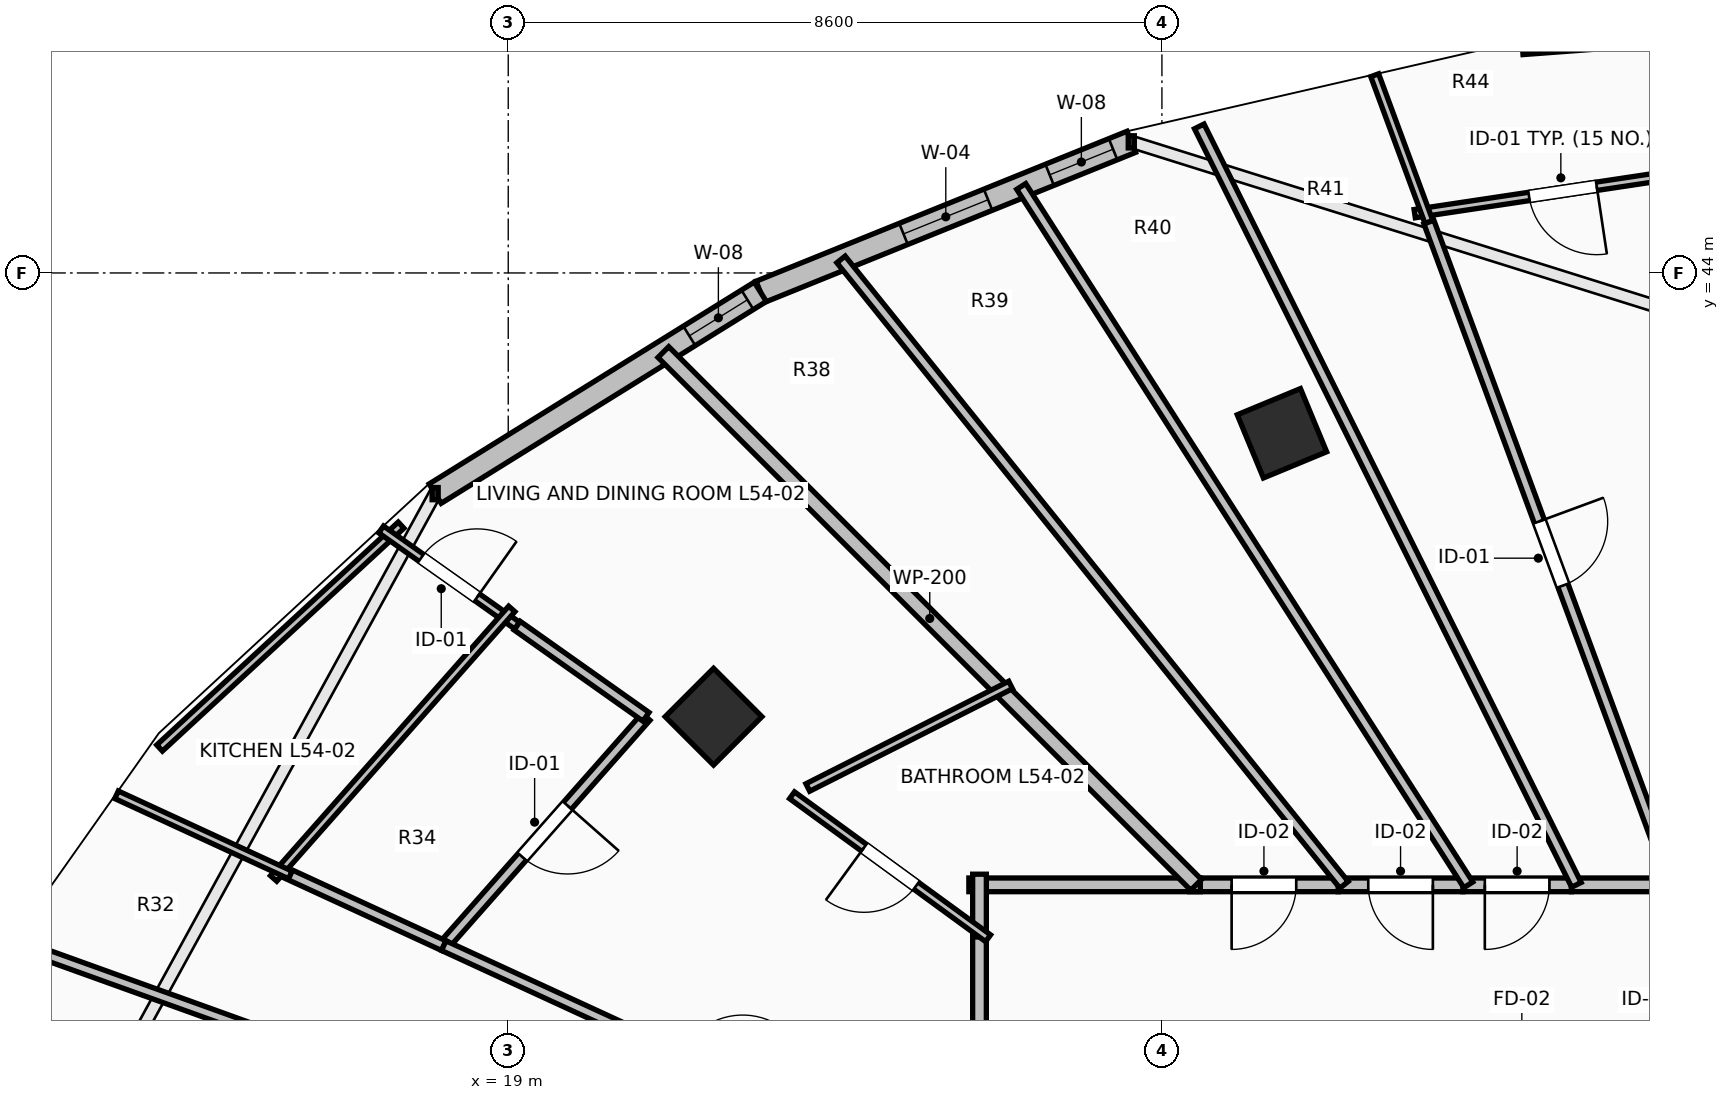
"""IFC4 building model, lengths in metres.
Left out: names, types, materials, properties, quantities, classifications, styles, units other than length and angle.
Written with IfcOpenShell. Run it as: python <this file> out.ifc"""

import sys

from ifc_helpers import new_model, si_unit, direction, frame, frame_2d, origin, origin_2d, place, context, subcontext, project, spatial, rectangle, extrude, element, fill, save


model = new_model("IFC4")
c1 = context("Model", 3, precision=1e-05, world=origin(), true_north=direction((0.0, 1.0)))
c2 = subcontext(c1, "Body", "Model", "MODEL_VIEW")
j1 = project(units=[si_unit("LENGTHUNIT", "METRE"), si_unit("PLANEANGLEUNIT", "RADIAN")], contexts=[c1])
p1 = place(None, origin())
s1 = spatial("IfcSite", under=j1, at=p1, CompositionType="ELEMENT")
p2 = place(p1, origin())
s2 = spatial("IfcBuilding", under=s1, at=p2, CompositionType="ELEMENT")
p3 = place(p2, frame((0.0, 0.0, 200.1)))
s3 = spatial("IfcBuildingStorey", under=s2, at=p3, CompositionType="ELEMENT", Elevation=200.1)
for number, where, z_axis, x_axis in (
    (1, (29.179, 41.891, 0.0), (0.0, 0.0, 1.0), (-0.383, 0.924, 0.0)),
    (2, (21.701, 38.162, 0.0), (0.0, 0.0, 1.0), (-0.707, 0.707, 0.0)),
):
    element("IfcColumn", number, at=place(p3, frame(where, z_axis=z_axis, x_axis=x_axis)), inside=s3, PredefinedType="COLUMN", context=c2, shape_type="SweptSolid", body=[
        extrude(rectangle(XDim=0.9, YDim=0.9, at=origin_2d()), origin(), (0.0, 0.0, 1.0), 3.55),
    ])
p4 = place(p3, frame((27.197, 45.725, 0.0), z_axis=(0.0, 0.0, 1.0), x_axis=(-0.927111094334, -0.374786630981, 0.0)))
e3 = element("IfcWall", 3, at=p4, inside=s3, PredefinedType="STANDARD", context=c2, shape_type="SweptSolid", body=[
    extrude(rectangle(XDim=5.264, YDim=0.3, at=frame_2d((2.632, 0.0))), origin(), (0.0, 0.0, 1.0), 3.29),
])
p5 = place(p4, frame((0.258, 0.0, 0.85)))
e4 = element("IfcOpeningElement", 4, at=p5, cuts=e3, PredefinedType="OPENING", context=c2, shape_type="SweptSolid", body=[
    extrude(rectangle(XDim=0.9, YDim=1.8, at=frame_2d((0.45, 0.9))), frame((0.0, 0.165, 0.0), z_axis=(0.0, -1.0, 0.0), x_axis=(1.0, 0.0, 0.0)), (0.0, 0.0, 1.0), 0.33),
])
p6 = place(p4, frame((2.032, 0.0, 0.85)))
e5 = element("IfcOpeningElement", 5, at=p6, cuts=e3, PredefinedType="OPENING", context=c2, shape_type="SweptSolid", body=[
    extrude(rectangle(XDim=1.2, YDim=1.95, at=frame_2d((0.6, 0.975))), frame((0.0, 0.165, 0.0), z_axis=(0.0, -1.0, 0.0), x_axis=(1.0, 0.0, 0.0)), (0.0, 0.0, 1.0), 0.33),
])
p7 = place(p3, frame((22.316, 43.752, 0.0), z_axis=(0.0, 0.0, 1.0), x_axis=(-0.849647657754, -0.527350791858, 0.0)))
e6 = element("IfcWall", 6, at=p7, inside=s3, PredefinedType="STANDARD", context=c2, shape_type="SweptSolid", body=[
    extrude(rectangle(XDim=5.035, YDim=0.3, at=frame_2d((2.518, 0.0))), origin(), (0.0, 0.0, 1.0), 3.29),
])
p8 = place(p7, frame((0.199, 0.0, 0.85)))
e7 = element("IfcOpeningElement", 7, at=p8, cuts=e6, PredefinedType="OPENING", context=c2, shape_type="SweptSolid", body=[
    extrude(rectangle(XDim=0.9, YDim=1.8, at=frame_2d((0.45, 0.9))), frame((0.0, 0.165, 0.0), z_axis=(0.0, -1.0, 0.0), x_axis=(1.0, 0.0, 0.0)), (0.0, 0.0, 1.0), 0.33),
])
p9 = place(p3, frame((34.265, 35.95, 0.0), z_axis=(0.0, 0.0, 1.0), x_axis=(-1.0, 0.0, 0.0)))
e8 = element("IfcWall", 8, at=p9, inside=s3, PredefinedType="PARTITIONING", context=c2, shape_type="SweptSolid", body=[
    extrude(rectangle(XDim=1.279, YDim=0.18, at=frame_2d((0.639, 0.0))), origin(), (0.0, 0.0, 1.0), 3.29),
])
p10 = place(p3, frame((32.986, 35.95, 0.0), z_axis=(0.0, 0.0, 1.0), x_axis=(-1.0, 0.0, 0.0)))
e9 = element("IfcWall", 9, at=p10, inside=s3, PredefinedType="PARTITIONING", context=c2, shape_type="SweptSolid", body=[
    extrude(rectangle(XDim=1.426, YDim=0.18, at=frame_2d((0.713, 0.0))), origin(), (0.0, 0.0, 1.0), 3.29),
])
p11 = place(p10, frame((0.288, 0.0, 0.0)))
e10 = element("IfcOpeningElement", 10, at=p11, cuts=e9, PredefinedType="OPENING", context=c2, shape_type="SweptSolid", body=[
    extrude(rectangle(XDim=0.85, YDim=2.1, at=frame_2d((0.425, 1.05))), frame((0.0, 0.105, 0.0), z_axis=(0.0, -1.0, 0.0), x_axis=(1.0, 0.0, 0.0)), (0.0, 0.0, 1.0), 0.21),
])
p12 = place(p3, frame((31.56, 35.95, 0.0), z_axis=(0.0, 0.0, 1.0), x_axis=(-1.0, 0.0, 0.0)))
e11 = element("IfcWall", 11, at=p12, inside=s3, PredefinedType="PARTITIONING", context=c2, shape_type="SweptSolid", body=[
    extrude(rectangle(XDim=1.641, YDim=0.18, at=frame_2d((0.821, 0.0))), origin(), (0.0, 0.0, 1.0), 2.482),
])
p13 = place(p12, frame((0.396, 0.0, 0.0)))
e12 = element("IfcOpeningElement", 12, at=p13, cuts=e11, PredefinedType="OPENING", context=c2, shape_type="SweptSolid", body=[
    extrude(rectangle(XDim=0.85, YDim=2.1, at=frame_2d((0.425, 1.05))), frame((0.0, 0.105, 0.0), z_axis=(0.0, -1.0, 0.0), x_axis=(1.0, 0.0, 0.0)), (0.0, 0.0, 1.0), 0.21),
])
p14 = place(p3, frame((29.919, 35.95, 0.0), z_axis=(0.0, 0.0, 1.0), x_axis=(-1.0, 0.0, 0.0)))
e13 = element("IfcWall", 13, at=p14, inside=s3, PredefinedType="PARTITIONING", context=c2, shape_type="SweptSolid", body=[
    extrude(rectangle(XDim=1.954, YDim=0.18, at=frame_2d((0.977, 0.0))), origin(), (0.0, 0.0, 1.0), 2.482),
])
p15 = place(p14, frame((0.552, 0.0, 0.0)))
e14 = element("IfcOpeningElement", 14, at=p15, cuts=e13, PredefinedType="OPENING", context=c2, shape_type="SweptSolid", body=[
    extrude(rectangle(XDim=0.85, YDim=2.1, at=frame_2d((0.425, 1.05))), frame((0.0, 0.105, 0.0), z_axis=(0.0, -1.0, 0.0), x_axis=(1.0, 0.0, 0.0)), (0.0, 0.0, 1.0), 0.21),
])
p16 = place(p3, frame((25.2, 35.404, 0.0), z_axis=(0.0, 0.0, 1.0), x_axis=(0.0, -1.0, 0.0)))
e15 = element("IfcWall", 15, at=p16, inside=s3, PredefinedType="PARTITIONING", context=c2, shape_type="SweptSolid", body=[
    extrude(rectangle(XDim=3.563, YDim=0.18, at=frame_2d((1.781, 0.0))), origin(), (0.0, 0.0, 1.0), 2.482),
])
p17 = place(p16, frame((1.281, 0.0, 0.0)))
e16 = element("IfcOpeningElement", 16, at=p17, cuts=e15, PredefinedType="OPENING", context=c2, shape_type="SweptSolid", body=[
    extrude(rectangle(XDim=1.0, YDim=2.15, at=frame_2d((0.5, 1.075))), frame((0.0, 0.105, 0.0), z_axis=(0.0, -1.0, 0.0), x_axis=(1.0, 0.0, 0.0)), (0.0, 0.0, 1.0), 0.21),
])
p18 = place(p3, frame((28.105, 35.95, 0.0), z_axis=(0.0, 0.0, 1.0), x_axis=(-1.0, 0.0, 0.0)))
e17 = element("IfcWall", 17, at=p18, inside=s3, PredefinedType="PARTITIONING", context=c2, shape_type="SweptSolid", body=[
    extrude(rectangle(XDim=3.045, YDim=0.18, at=frame_2d((1.522, 0.0))), origin(), (0.0, 0.0, 1.0), 2.482),
])
p19 = place(p3, frame((25.2, 36.09, 0.0), z_axis=(0.0, 0.0, 1.0), x_axis=(0.0, -1.0, 0.0)))
e18 = element("IfcWall", 18, at=p19, inside=s3, PredefinedType="PARTITIONING", context=c2, shape_type="SweptSolid", body=[
    extrude(rectangle(XDim=0.826, YDim=0.18, at=frame_2d((0.413, 0.0))), origin(), (0.0, 0.0, 1.0), 2.482),
])
p20 = place(p3, frame((34.589, 47.095, 0.0), z_axis=(0.0, 0.0, 1.0), x_axis=(-0.997205784552, -0.074703569226, 0.0)))
e19 = element("IfcWall", 19, at=p20, inside=s3, PredefinedType="PARTITIONING", context=c2, shape_type="SweptSolid", body=[
    extrude(rectangle(XDim=2.249, YDim=0.11, at=frame_2d((1.124, 0.0))), origin(), (0.0, 0.0, 1.0), 3.29),
])
p21 = place(p3, frame((34.824, 45.367, 0.0), z_axis=(0.0, 0.0, 1.0), x_axis=(-0.988877230123, -0.148734070555, 0.0)))
e20 = element("IfcWall", 20, at=p21, inside=s3, PredefinedType="PARTITIONING", context=c2, shape_type="SweptSolid", body=[
    extrude(rectangle(XDim=3.943, YDim=0.11, at=frame_2d((1.971, 0.0))), origin(), (0.0, 0.0, 1.0), 3.29),
])
p22 = place(p21, frame((1.521, 0.0, 0.0)))
e21 = element("IfcOpeningElement", 21, at=p22, cuts=e20, PredefinedType="OPENING", context=c2, shape_type="SweptSolid", body=[
    extrude(rectangle(XDim=0.9, YDim=2.1, at=frame_2d((0.45, 1.05))), frame((0.0, 0.07, 0.0), z_axis=(0.0, -1.0, 0.0), x_axis=(1.0, 0.0, 0.0)), (0.0, 0.0, 1.0), 0.14),
])
p23 = place(p3, frame((31.113, 44.67, 0.0), z_axis=(0.0, 0.0, 1.0), x_axis=(-0.346337161188, 0.938110105894, 0.0)))
e22 = element("IfcWall", 22, at=p23, inside=s3, PredefinedType="PARTITIONING", context=c2, shape_type="SweptSolid", body=[
    extrude(rectangle(XDim=2.059, YDim=0.11, at=frame_2d((1.03, 0.0))), origin(), (0.0, 0.0, 1.0), 3.29),
])
p24 = place(p3, frame((31.112, 44.67, 0.0), z_axis=(0.0, 0.0, 1.0), x_axis=(0.346109472243, -0.938194134081, 0.0)))
e23 = element("IfcWall", 23, at=p24, inside=s3, PredefinedType="PARTITIONING", context=c2, shape_type="SweptSolid", body=[
    extrude(rectangle(XDim=9.294, YDim=0.14, at=frame_2d((4.647, 0.0))), origin(), (0.0, 0.0, 1.0), 2.482),
])
p25 = place(p24, frame((4.197, 0.0, 0.0)))
e24 = element("IfcOpeningElement", 24, at=p25, cuts=e23, PredefinedType="OPENING", context=c2, shape_type="SweptSolid", body=[
    extrude(rectangle(XDim=0.9, YDim=2.1, at=frame_2d((0.45, 1.05))), frame((0.0, 0.085, 0.0), z_axis=(0.0, -1.0, 0.0), x_axis=(1.0, 0.0, 0.0)), (0.0, 0.0, 1.0), 0.17),
])
p26 = place(p3, frame((28.091, 45.928, 0.0), z_axis=(0.0, 0.0, 1.0), x_axis=(0.445267068418, -0.895397809793, 0.0)))
e25 = element("IfcWall", 25, at=p26, inside=s3, PredefinedType="PARTITIONING", context=c2, shape_type="SweptSolid", body=[
    extrude(rectangle(XDim=11.144, YDim=0.14, at=frame_2d((5.572, 0.0))), origin(), (0.0, 0.0, 1.0), 2.482),
])
p27 = place(p3, frame((25.749, 45.138, 0.0), z_axis=(0.0, 0.0, 1.0), x_axis=(0.539168632786, -0.842197830335, 0.0)))
e26 = element("IfcWall", 26, at=p27, inside=s3, PredefinedType="PARTITIONING", context=c2, shape_type="SweptSolid", body=[
    extrude(rectangle(XDim=10.909, YDim=0.14, at=frame_2d((5.455, 0.0))), origin(), (0.0, 0.0, 1.0), 2.482),
])
p28 = place(p3, frame((23.378, 44.178, 0.0), z_axis=(0.0, 0.0, 1.0), x_axis=(0.626756813732, -0.779214923137, 0.0)))
e27 = element("IfcWall", 27, at=p28, inside=s3, PredefinedType="PARTITIONING", context=c2, shape_type="SweptSolid", body=[
    extrude(rectangle(XDim=10.559, YDim=0.14, at=frame_2d((5.28, 0.0))), origin(), (0.0, 0.0, 1.0), 2.482),
])
p29 = place(p3, frame((21.041, 42.959, 0.0), z_axis=(0.0, 0.0, 1.0), x_axis=(0.707106781187, -0.707106781187, 0.0)))
e28 = element("IfcWall", 28, at=p29, inside=s3, PredefinedType="PARTITIONING", context=c2, shape_type="SweptSolid", body=[
    extrude(rectangle(XDim=9.912, YDim=0.2, at=frame_2d((4.956, 0.0))), origin(), (0.0, 0.0, 1.0), 2.482),
])
p30 = place(p3, frame((25.313, 35.248, 0.0), z_axis=(0.0, 0.0, 1.0), x_axis=(-0.807968083988, 0.58922625133, 0.0)))
e29 = element("IfcWall", 29, at=p30, inside=s3, PredefinedType="PARTITIONING", context=c2, shape_type="SweptSolid", body=[
    extrude(rectangle(XDim=3.192, YDim=0.11, at=frame_2d((1.596, 0.0))), origin(), (0.0, 0.0, 1.0), 2.482),
])
p31 = place(p30, frame((1.171, 0.0, 0.0)))
e30 = element("IfcOpeningElement", 30, at=p31, cuts=e29, PredefinedType="OPENING", context=c2, shape_type="SweptSolid", body=[
    extrude(rectangle(XDim=0.85, YDim=2.1, at=frame_2d((0.425, 1.05))), frame((0.0, 0.07, 0.0), z_axis=(0.0, -1.0, 0.0), x_axis=(1.0, 0.0, 0.0)), (0.0, 0.0, 1.0), 0.14),
])
p32 = place(p3, frame((22.941, 37.231, 0.0), z_axis=(0.0, 0.0, 1.0), x_axis=(0.892507731149, 0.451032094024, 0.0)))
e31 = element("IfcWall", 31, at=p32, inside=s3, PredefinedType="PARTITIONING", context=c2, shape_type="SweptSolid", body=[
    extrude(rectangle(XDim=2.989, YDim=0.11, at=frame_2d((1.495, 0.0))), origin(), (0.0, 0.0, 1.0), 2.482),
])
p33 = place(p3, frame((17.59, 40.682, 0.0), z_axis=(0.0, 0.0, 1.0), x_axis=(-0.734861902375, -0.678216768031, 0.0)))
e32 = element("IfcWall", 32, at=p33, inside=s3, PredefinedType="PARTITIONING", context=c2, shape_type="SweptSolid", body=[
    extrude(rectangle(XDim=4.323, YDim=0.11, at=frame_2d((2.162, 0.0))), origin(), (0.0, 0.0, 1.0), 3.29),
])
p34 = place(p3, frame((17.328, 40.626, 0.0), z_axis=(0.0, 0.0, 1.0), x_axis=(0.816448938693, -0.577417639588, 0.0)))
e33 = element("IfcWall", 33, at=p34, inside=s3, PredefinedType="PARTITIONING", context=c2, shape_type="SweptSolid", body=[
    extrude(rectangle(XDim=2.192, YDim=0.11, at=frame_2d((1.096, 0.0))), origin(), (0.0, 0.0, 1.0), 3.29),
])
p35 = place(p34, frame((0.646, 0.0, 0.0)))
e34 = element("IfcOpeningElement", 34, at=p35, cuts=e33, PredefinedType="OPENING", context=c2, shape_type="SweptSolid", body=[
    extrude(rectangle(XDim=0.9, YDim=2.1, at=frame_2d((0.45, 1.05))), frame((0.0, 0.07, 0.0), z_axis=(0.0, -1.0, 0.0), x_axis=(1.0, 0.0, 0.0)), (0.0, 0.0, 1.0), 0.14),
])
p36 = place(p3, frame((20.812, 38.161, 0.0), z_axis=(0.0, 0.0, 1.0), x_axis=(-0.662063683649, -0.749447582418, 0.0)))
e35 = element("IfcWall", 35, at=p36, inside=s3, PredefinedType="PARTITIONING", context=c2, shape_type="SweptSolid", body=[
    extrude(rectangle(XDim=4.018, YDim=0.14, at=frame_2d((2.009, 0.0))), origin(), (0.0, 0.0, 1.0), 3.29),
])
p37 = place(p36, frame((1.559, 0.0, 0.0)))
e36 = element("IfcOpeningElement", 36, at=p37, cuts=e35, PredefinedType="OPENING", context=c2, shape_type="SweptSolid", body=[
    extrude(rectangle(XDim=0.9, YDim=2.1, at=frame_2d((0.45, 1.05))), frame((0.0, 0.085, 0.0), z_axis=(0.0, -1.0, 0.0), x_axis=(1.0, 0.0, 0.0)), (0.0, 0.0, 1.0), 0.17),
])
p38 = place(p3, frame((18.152, 35.15, 0.0), z_axis=(0.0, 0.0, 1.0), x_axis=(-0.908192094718, 0.418553603607, 0.0)))
e37 = element("IfcWall", 37, at=p38, inside=s3, PredefinedType="PARTITIONING", context=c2, shape_type="SweptSolid", body=[
    extrude(rectangle(XDim=2.363, YDim=0.14, at=frame_2d((1.182, 0.0))), origin(), (0.0, 0.0, 1.0), 3.29),
])
p39 = place(p3, frame((19.117, 39.36, 0.0), z_axis=(0.0, 0.0, 1.0), x_axis=(0.816315567802, -0.577606175316, 0.0)))
e38 = element("IfcWall", 38, at=p39, inside=s3, PredefinedType="PARTITIONING", context=c2, shape_type="SweptSolid", body=[
    extrude(rectangle(XDim=2.076, YDim=0.14, at=frame_2d((1.038, 0.0))), origin(), (0.0, 0.0, 1.0), 3.29),
])
p40 = place(p3, frame((18.152, 35.15, 0.0), z_axis=(0.0, 0.0, 1.0), x_axis=(0.908152637685, -0.418639208227, 0.0)))
e39 = element("IfcWall", 39, at=p40, inside=s3, PredefinedType="PARTITIONING", context=c2, shape_type="SweptSolid", body=[
    extrude(rectangle(XDim=7.761, YDim=0.14, at=frame_2d((3.88, 0.0))), origin(), (0.0, 0.0, 1.0), 2.824),
])
p41 = place(p40, frame((3.43, 0.0, 0.0)))
e40 = element("IfcOpeningElement", 40, at=p41, cuts=e39, PredefinedType="OPENING", context=c2, shape_type="SweptSolid", body=[
    extrude(rectangle(XDim=0.9, YDim=2.1, at=frame_2d((0.45, 1.05))), frame((0.0, 0.085, 0.0), z_axis=(0.0, -1.0, 0.0), x_axis=(1.0, 0.0, 0.0)), (0.0, 0.0, 1.0), 0.17),
])
p42 = place(p3, frame((15.913, 36.034, 0.0), z_axis=(0.0, 0.0, 1.0), x_axis=(0.662189711464, 0.749336230294, 0.0)))
e41 = element("IfcWall", 41, at=p42, inside=s3, PredefinedType="PARTITIONING", context=c2, shape_type="SweptSolid", body=[
    extrude(rectangle(XDim=4.732, YDim=0.11, at=frame_2d((2.366, 0.0))), origin(), (0.0, 0.0, 1.0), 3.29),
])
p43 = place(p3, frame((13.847, 37.135, 0.0), z_axis=(0.0, 0.0, 1.0), x_axis=(0.908101251341, -0.418750662462, 0.0)))
e42 = element("IfcWall", 42, at=p43, inside=s3, PredefinedType="PARTITIONING", context=c2, shape_type="SweptSolid", body=[
    extrude(rectangle(XDim=2.518, YDim=0.11, at=frame_2d((1.259, 0.0))), origin(), (0.0, 0.0, 1.0), 3.29),
])
p44 = place(p3, frame((12.609, 35.141, 0.0), z_axis=(0.0, 0.0, 1.0), x_axis=(0.940877411069, -0.338747246985, 0.0)))
e43 = element("IfcWall", 43, at=p44, inside=s3, PredefinedType="PARTITIONING", context=c2, shape_type="SweptSolid", body=[
    extrude(rectangle(XDim=13.382, YDim=0.14, at=frame_2d((6.691, 0.0))), origin(), (0.0, 0.0, 1.0), 2.824),
])
p45 = place(p44, frame((6.266, 0.0, 0.0)))
e44 = element("IfcOpeningElement", 44, at=p45, cuts=e43, PredefinedType="OPENING", context=c2, shape_type="SweptSolid", body=[
    extrude(rectangle(XDim=0.85, YDim=2.1, at=frame_2d((0.425, 1.05))), frame((0.0, 0.085, 0.0), z_axis=(0.0, -1.0, 0.0), x_axis=(1.0, 0.0, 0.0)), (0.0, 0.0, 1.0), 0.17),
])
p46 = place(p5, origin())
e45 = element("IfcWindow", 45, at=p46, inside=s3, PartitioningType="SINGLE_PANEL", PredefinedType="WINDOW", context=c2, shape_type="SweptSolid", body=[
    extrude(rectangle(XDim=0.9, YDim=1.8, at=frame_2d((0.45, 0.9))), frame((0.0, 0.03, 0.0), z_axis=(0.0, -1.0, 0.0), x_axis=(1.0, 0.0, 0.0)), (0.0, 0.0, 1.0), 0.06),
])
fill(e4, e45)
p47 = place(p6, origin())
e46 = element("IfcWindow", 46, at=p47, inside=s3, PartitioningType="SINGLE_PANEL", PredefinedType="WINDOW", context=c2, shape_type="SweptSolid", body=[
    extrude(rectangle(XDim=1.2, YDim=1.95, at=frame_2d((0.6, 0.975))), frame((0.0, 0.03, 0.0), z_axis=(0.0, -1.0, 0.0), x_axis=(1.0, 0.0, 0.0)), (0.0, 0.0, 1.0), 0.06),
])
fill(e5, e46)
p48 = place(p8, origin())
e47 = element("IfcWindow", 47, at=p48, inside=s3, PartitioningType="SINGLE_PANEL", PredefinedType="WINDOW", context=c2, shape_type="SweptSolid", body=[
    extrude(rectangle(XDim=0.9, YDim=1.8, at=frame_2d((0.45, 0.9))), frame((0.0, 0.03, 0.0), z_axis=(0.0, -1.0, 0.0), x_axis=(1.0, 0.0, 0.0)), (0.0, 0.0, 1.0), 0.06),
])
fill(e7, e47)
p49 = place(p22, origin())
e48 = element("IfcDoor", 48, at=p49, inside=s3, OperationType="SINGLE_SWING_LEFT", PredefinedType="DOOR", context=c2, shape_type="SweptSolid", body=[
    extrude(rectangle(XDim=0.9, YDim=2.1, at=frame_2d((0.45, 1.05))), frame((0.0, 0.025, 0.0), z_axis=(0.0, -1.0, 0.0), x_axis=(1.0, 0.0, 0.0)), (0.0, 0.0, 1.0), 0.05),
])
fill(e21, e48)
p50 = place(p25, origin())
e49 = element("IfcDoor", 49, at=p50, inside=s3, OperationType="SINGLE_SWING_LEFT", PredefinedType="DOOR", context=c2, shape_type="SweptSolid", body=[
    extrude(rectangle(XDim=0.9, YDim=2.1, at=frame_2d((0.45, 1.05))), frame((0.0, 0.025, 0.0), z_axis=(0.0, -1.0, 0.0), x_axis=(1.0, 0.0, 0.0)), (0.0, 0.0, 1.0), 0.05),
])
fill(e24, e49)
p51 = place(p31, origin())
e50 = element("IfcDoor", 50, at=p51, inside=s3, OperationType="SINGLE_SWING_RIGHT", PredefinedType="DOOR", context=c2, shape_type="SweptSolid", body=[
    extrude(rectangle(XDim=0.85, YDim=2.1, at=frame_2d((0.425, 1.05))), frame((0.0, 0.025, 0.0), z_axis=(0.0, -1.0, 0.0), x_axis=(1.0, 0.0, 0.0)), (0.0, 0.0, 1.0), 0.05),
])
fill(e30, e50)
p52 = place(p35, origin())
e51 = element("IfcDoor", 51, at=p52, inside=s3, OperationType="SINGLE_SWING_RIGHT", PredefinedType="DOOR", context=c2, shape_type="SweptSolid", body=[
    extrude(rectangle(XDim=0.9, YDim=2.1, at=frame_2d((0.45, 1.05))), frame((0.0, 0.025, 0.0), z_axis=(0.0, -1.0, 0.0), x_axis=(1.0, 0.0, 0.0)), (0.0, 0.0, 1.0), 0.05),
])
fill(e34, e51)
p53 = place(p37, origin())
e52 = element("IfcDoor", 52, at=p53, inside=s3, OperationType="SINGLE_SWING_LEFT", PredefinedType="DOOR", context=c2, shape_type="SweptSolid", body=[
    extrude(rectangle(XDim=0.9, YDim=2.1, at=frame_2d((0.45, 1.05))), frame((0.0, 0.025, 0.0), z_axis=(0.0, -1.0, 0.0), x_axis=(1.0, 0.0, 0.0)), (0.0, 0.0, 1.0), 0.05),
])
fill(e36, e52)
p54 = place(p11, origin())
e53 = element("IfcDoor", 53, at=p54, inside=s3, OperationType="SINGLE_SWING_RIGHT", PredefinedType="DOOR", context=c2, shape_type="SweptSolid", body=[
    extrude(rectangle(XDim=0.85, YDim=2.1, at=frame_2d((0.425, 1.05))), frame((0.0, 0.025, 0.0), z_axis=(0.0, -1.0, 0.0), x_axis=(1.0, 0.0, 0.0)), (0.0, 0.0, 1.0), 0.05),
])
fill(e10, e53)
p55 = place(p13, origin())
e54 = element("IfcDoor", 54, at=p55, inside=s3, OperationType="SINGLE_SWING_LEFT", PredefinedType="DOOR", context=c2, shape_type="SweptSolid", body=[
    extrude(rectangle(XDim=0.85, YDim=2.1, at=frame_2d((0.425, 1.05))), frame((0.0, 0.025, 0.0), z_axis=(0.0, -1.0, 0.0), x_axis=(1.0, 0.0, 0.0)), (0.0, 0.0, 1.0), 0.05),
])
fill(e12, e54)
p56 = place(p15, origin())
e55 = element("IfcDoor", 55, at=p56, inside=s3, OperationType="SINGLE_SWING_RIGHT", PredefinedType="DOOR", context=c2, shape_type="SweptSolid", body=[
    extrude(rectangle(XDim=0.85, YDim=2.1, at=frame_2d((0.425, 1.05))), frame((0.0, 0.025, 0.0), z_axis=(0.0, -1.0, 0.0), x_axis=(1.0, 0.0, 0.0)), (0.0, 0.0, 1.0), 0.05),
])
fill(e14, e55)
save(model, sys.argv[1])
